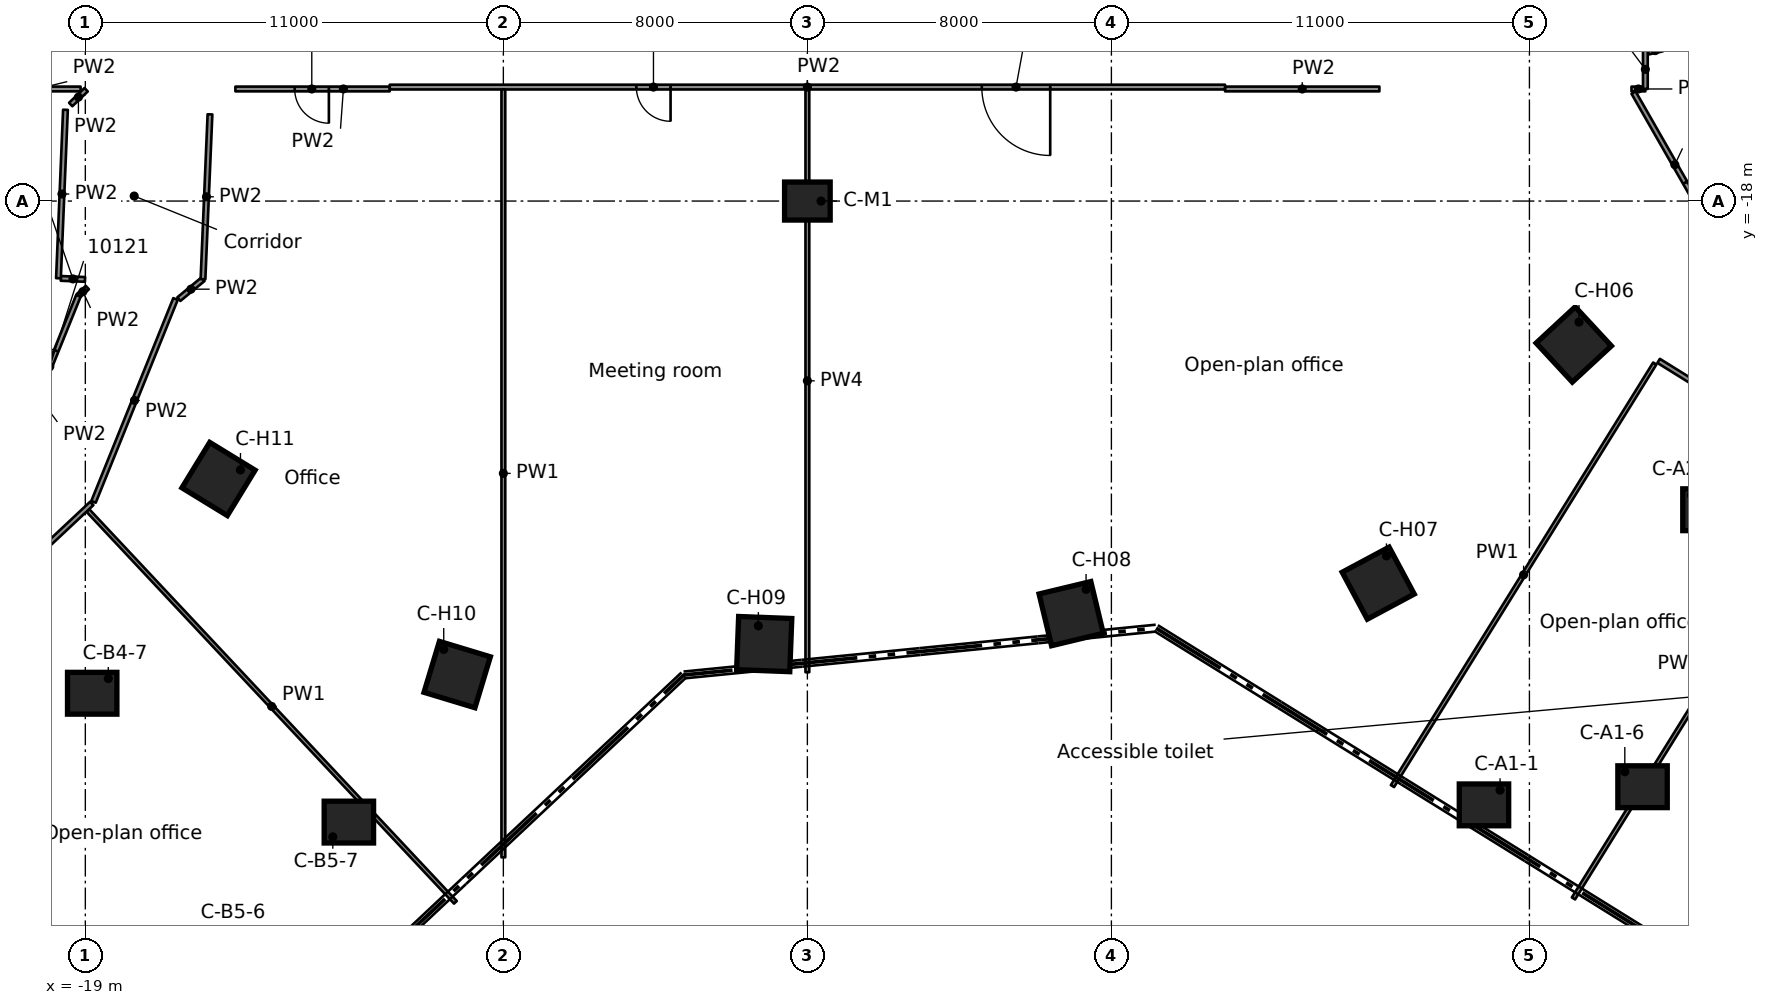
"""IFC4 building model, lengths in metres.
Left out: names, types, materials, properties, quantities, classifications, styles, units other than length and angle.
Written with IfcOpenShell. Run it as: python <this file> out.ifc"""

import sys

from ifc_helpers import new_model, si_unit, direction, frame, frame_2d, origin, origin_2d, place, context, subcontext, project, spatial, rectangle, extrude, element, fill, save


model = new_model("IFC4")
c1 = context("Model", 3, precision=1e-05, world=origin(), true_north=direction((0.0, 1.0)))
c2 = subcontext(c1, "Body", "Model", "MODEL_VIEW")
j1 = project(units=[si_unit("LENGTHUNIT", "METRE"), si_unit("PLANEANGLEUNIT", "RADIAN")], contexts=[c1])
p1 = place(None, origin())
s1 = spatial("IfcSite", under=j1, at=p1, CompositionType="ELEMENT")
p2 = place(p1, origin())
s2 = spatial("IfcBuilding", under=s1, at=p2, CompositionType="ELEMENT")
p3 = place(p2, frame((0.0, 0.0, 51.3)))
s3 = spatial("IfcBuildingStorey", under=s2, at=p3, CompositionType="ELEMENT", Elevation=51.3)
for number, where, z_axis, x_axis in (
    (1, (17.804, -33.888, 0.0), (0.0, 0.0, 1.0), (1.0, 0.0, 0.0)),
    (2, (21.977, -33.41, 0.0), (0.0, 0.0, 1.0), (1.0, 0.0, 0.0)),
    (3, (23.685, -26.122, 0.0), (0.0, 0.0, 1.0), (1.0, 0.0, 0.0)),
    (4, (-18.819, -30.951, 0.0), (0.0, 0.0, 1.0), (1.0, 0.0, 0.0)),
    (5, (-12.065, -34.341, 0.0), (0.0, 0.0, 1.0), (1.0, 0.0, 0.0)),
):
    element("IfcColumn", number, at=place(p3, frame(where, z_axis=z_axis, x_axis=x_axis)), inside=s3, PredefinedType="COLUMN", context=c2, shape_type="SweptSolid", body=[
        extrude(rectangle(XDim=1.3, YDim=1.1, at=origin_2d()), origin(), (0.0, 0.0, 1.0), 3.5),
    ])
for number, where, z_axis, x_axis in (
    (6, (20.167, -21.774, 0.0), (0.0, 0.0, 1.0), (0.68, -0.734, 0.0)),
    (7, (15.021, -28.054, 0.0), (0.0, 0.0, 1.0), (0.472, -0.882, 0.0)),
    (8, (6.942, -28.856, 0.0), (0.0, 0.0, 1.0), (0.234, -0.972, 0.0)),
    (9, (-1.136, -29.657, 0.0), (0.0, 0.0, 1.0), (-0.038, -0.999, 0.0)),
    (10, (-9.215, -30.459, 0.0), (0.0, 0.0, 1.0), (-0.29, -0.957, 0.0)),
    (11, (-15.495, -25.313, 0.0), (0.0, 0.0, 1.0), (-0.522, -0.853, 0.0)),
):
    element("IfcColumn", number, at=place(p3, frame(where, z_axis=z_axis, x_axis=x_axis)), inside=s3, PredefinedType="COLUMN", context=c2, shape_type="SweptSolid", body=[
        extrude(rectangle(XDim=1.4, YDim=1.4, at=origin_2d()), origin(), (0.0, 0.0, 1.0), 3.5),
    ])
p4 = place(p3, frame((0.0, -18.0, 0.0), z_axis=(0.0, 0.0, 1.0), x_axis=(1.0, 0.0, 0.0)))
e12 = element("IfcColumn", 12, at=p4, inside=s3, PredefinedType="COLUMN", context=c2, shape_type="SweptSolid", body=[
    extrude(rectangle(XDim=1.2, YDim=1.0, at=origin_2d()), origin(), (0.0, 0.0, 1.0), 3.5),
])
p5 = place(p3, frame((21.74, -15.145, 0.0), z_axis=(0.0, 0.0, 1.0), x_axis=(0.496826277176, -0.867850016021, 0.0)))
e13 = element("IfcWall", 13, at=p5, inside=s3, PredefinedType="PARTITIONING", context=c2, shape_type="SweptSolid", body=[
    extrude(rectangle(XDim=5.469, YDim=0.125, at=frame_2d((2.734, 0.0))), origin(), (0.0, 0.0, 1.0), 3.08),
])
p6 = place(p5, frame((2.733, 0.0, 0.0)))
e14 = element("IfcOpeningElement", 14, at=p6, cuts=e13, PredefinedType="OPENING", context=c2, shape_type="SweptSolid", body=[
    extrude(rectangle(XDim=0.9, YDim=2.1, at=frame_2d((0.45, 1.05))), frame((0.0, 0.073, 0.0), z_axis=(0.0, -1.0, 0.0), x_axis=(1.0, 0.0, 0.0)), (0.0, 0.0, 1.0), 0.145),
])
p7 = place(p3, frame((-26.451, -33.192, 0.0), z_axis=(0.0, 0.0, 1.0), x_axis=(0.684103113435, -0.729385309825, 0.0)))
e15 = element("IfcWall", 15, at=p7, inside=s3, PredefinedType="PARTITIONING", context=c2, shape_type="SweptSolid", body=[
    extrude(rectangle(XDim=14.137, YDim=0.1, at=frame_2d((7.068, 0.0))), origin(), (0.0, 0.0, 1.0), 2.445),
])
p8 = place(p3, frame((-18.934, -26.141, 0.0), z_axis=(0.0, 0.0, 1.0), x_axis=(0.684157665042, -0.729334141094, 0.0)))
e16 = element("IfcWall", 16, at=p8, inside=s3, PredefinedType="PARTITIONING", context=c2, shape_type="SweptSolid", body=[
    extrude(rectangle(XDim=14.137, YDim=0.1, at=frame_2d((7.069, 0.0))), origin(), (0.0, 0.0, 1.0), 3.08),
])
p9 = place(p3, frame((43.368, -35.223, 0.0), z_axis=(0.0, 0.0, 1.0), x_axis=(-0.849582235026, 0.527456183895, 0.0)))
e17 = element("IfcWall", 17, at=p9, inside=s3, PredefinedType="PARTITIONING", context=c2, shape_type="SweptSolid", body=[
    extrude(rectangle(XDim=24.68, YDim=0.125, at=frame_2d((12.34, 0.0))), origin(), (0.0, 0.0, 1.0), 3.08),
])
p10 = place(p9, frame((3.474, 0.0, 0.0)))
e18 = element("IfcOpeningElement", 18, at=p10, cuts=e17, PredefinedType="OPENING", context=c2, shape_type="SweptSolid", body=[
    extrude(rectangle(XDim=0.9, YDim=2.1, at=frame_2d((0.45, 1.05))), frame((0.0, 0.073, 0.0), z_axis=(0.0, -1.0, 0.0), x_axis=(1.0, 0.0, 0.0)), (0.0, 0.0, 1.0), 0.145),
])
p11 = place(p9, frame((21.473, 0.0, 0.0)))
e19 = element("IfcOpeningElement", 19, at=p11, cuts=e17, PredefinedType="OPENING", context=c2, shape_type="SweptSolid", body=[
    extrude(rectangle(XDim=1.1, YDim=2.1, at=frame_2d((0.55, 1.05))), frame((0.0, 0.073, 0.0), z_axis=(0.0, -1.0, 0.0), x_axis=(1.0, 0.0, 0.0)), (0.0, 0.0, 1.0), 0.145),
])
p12 = place(p9, frame((6.223, 0.0, 0.0)))
e20 = element("IfcOpeningElement", 20, at=p12, cuts=e17, PredefinedType="OPENING", context=c2, shape_type="SweptSolid", body=[
    extrude(rectangle(XDim=1.8, YDim=2.1, at=frame_2d((0.9, 1.05))), frame((0.0, 0.073, 0.0), z_axis=(0.0, -1.0, 0.0), x_axis=(1.0, 0.0, 0.0)), (0.0, 0.0, 1.0), 0.145),
])
p13 = place(p9, frame((11.474, 0.0, 0.0)))
e21 = element("IfcOpeningElement", 21, at=p13, cuts=e17, PredefinedType="OPENING", context=c2, shape_type="SweptSolid", body=[
    extrude(rectangle(XDim=1.1, YDim=2.1, at=frame_2d((0.55, 1.05))), frame((0.0, 0.073, 0.0), z_axis=(0.0, -1.0, 0.0), x_axis=(1.0, 0.0, 0.0)), (0.0, 0.0, 1.0), 0.145),
])
p14 = place(p3, frame((-16.539, -20.581, 0.0), z_axis=(0.0, 0.0, 1.0), x_axis=(0.771202229891, 0.636590229748, 0.0)))
e22 = element("IfcWall", 22, at=p14, inside=s3, PredefinedType="PARTITIONING", context=c2, shape_type="SweptSolid", body=[
    extrude(rectangle(XDim=0.823, YDim=0.125, at=frame_2d((0.412, 0.0))), origin(), (0.0, 0.0, 1.0), 3.08),
])
p15 = place(p3, frame((-19.644, -20.035, 0.0), z_axis=(0.0, 0.0, 1.0), x_axis=(0.999093412753, -0.04257173467, 0.0)))
e23 = element("IfcWall", 23, at=p15, inside=s3, PredefinedType="PARTITIONING", context=c2, shape_type="SweptSolid", body=[
    extrude(rectangle(XDim=0.636, YDim=0.125, at=frame_2d((0.318, 0.0))), origin(), (0.0, 0.0, 1.0), 3.08),
])
p16 = place(p3, frame((-21.418, -15.051, 0.0), z_axis=(0.0, 0.0, 1.0), x_axis=(1.0, 0.0, 0.0)))
e24 = element("IfcWall", 24, at=p16, inside=s3, PredefinedType="PARTITIONING", context=c2, shape_type="SweptSolid", body=[
    extrude(rectangle(XDim=2.293, YDim=0.125, at=frame_2d((1.146, 0.0))), origin(), (0.0, 0.0, 1.0), 3.08),
])
p17 = place(p3, frame((-10.991, -15.051, 0.0), z_axis=(0.0, 0.0, 1.0), x_axis=(-1.0, 0.0, 0.0)))
e25 = element("IfcWall", 25, at=p17, inside=s3, PredefinedType="PARTITIONING", context=c2, shape_type="SweptSolid", body=[
    extrude(rectangle(XDim=4.06, YDim=0.125, at=frame_2d((2.03, 0.0))), origin(), (0.0, 0.0, 1.0), 3.08),
])
p18 = place(p17, frame((1.6, 0.0, 0.0)))
e26 = element("IfcOpeningElement", 26, at=p18, cuts=e25, PredefinedType="OPENING", context=c2, shape_type="SweptSolid", body=[
    extrude(rectangle(XDim=0.9, YDim=2.1, at=frame_2d((0.45, 1.05))), frame((0.0, 0.073, 0.0), z_axis=(0.0, -1.0, 0.0), x_axis=(1.0, 0.0, 0.0)), (0.0, 0.0, 1.0), 0.145),
])
p19 = place(p3, frame((10.991, -15.051, 0.0), z_axis=(0.0, 0.0, 1.0), x_axis=(1.0, 0.0, 0.0)))
e27 = element("IfcWall", 27, at=p19, inside=s3, PredefinedType="PARTITIONING", context=c2, shape_type="SweptSolid", body=[
    extrude(rectangle(XDim=4.061, YDim=0.125, at=frame_2d((2.031, 0.0))), origin(), (0.0, 0.0, 1.0), 3.08),
])
p20 = place(p3, frame((21.686, -15.051, 0.0), z_axis=(0.0, 0.0, 1.0), x_axis=(1.0, 0.0, 0.0)))
e28 = element("IfcWall", 28, at=p20, inside=s3, PredefinedType="PARTITIONING", context=c2, shape_type="SweptSolid", body=[
    extrude(rectangle(XDim=0.364, YDim=0.125, at=frame_2d((0.182, 0.0))), origin(), (0.0, 0.0, 1.0), 3.08),
])
p21 = place(p3, frame((10.99, -15.001, 0.0), z_axis=(0.0, 0.0, 1.0), x_axis=(-1.0, 0.0, 0.0)))
e29 = element("IfcWall", 29, at=p21, inside=s3, PredefinedType="PARTITIONING", context=c2, shape_type="SweptSolid", body=[
    extrude(rectangle(XDim=21.98, YDim=0.125, at=frame_2d((10.99, 0.0))), origin(), (0.0, 0.0, 1.0), 3.08),
])
p22 = place(p21, frame((14.59, 0.0, 0.0)))
e30 = element("IfcOpeningElement", 30, at=p22, cuts=e29, PredefinedType="OPENING", context=c2, shape_type="SweptSolid", body=[
    extrude(rectangle(XDim=0.9, YDim=2.1, at=frame_2d((0.45, 1.05))), frame((0.0, 0.073, 0.0), z_axis=(0.0, -1.0, 0.0), x_axis=(1.0, 0.0, 0.0)), (0.0, 0.0, 1.0), 0.145),
])
p23 = place(p21, frame((4.6, 0.0, 0.0)))
e31 = element("IfcOpeningElement", 31, at=p23, cuts=e29, PredefinedType="OPENING", context=c2, shape_type="SweptSolid", body=[
    extrude(rectangle(XDim=1.8, YDim=2.1, at=frame_2d((0.9, 1.05))), frame((0.0, 0.073, 0.0), z_axis=(0.0, -1.0, 0.0), x_axis=(1.0, 0.0, 0.0)), (0.0, 0.0, 1.0), 0.145),
])
p24 = place(p3, frame((22.127, -14.081, 0.0), z_axis=(0.0, 0.0, 1.0), x_axis=(0.976967058765, 0.213390173362, 0.0)))
e32 = element("IfcWall", 32, at=p24, inside=s3, PredefinedType="PARTITIONING", context=c2, shape_type="SweptSolid", body=[
    extrude(rectangle(XDim=0.38, YDim=0.125, at=frame_2d((0.19, 0.0))), origin(), (0.0, 0.0, 1.0), 3.08),
])
p25 = place(p3, frame((-19.181, -20.491, 0.0), z_axis=(0.0, 0.0, 1.0), x_axis=(0.734655808159, 0.678440007325, 0.0)))
e33 = element("IfcWall", 33, at=p25, inside=s3, PredefinedType="PARTITIONING", context=c2, shape_type="SweptSolid", body=[
    extrude(rectangle(XDim=0.317, YDim=0.125, at=frame_2d((0.159, 0.0))), origin(), (0.0, 0.0, 1.0), 3.08),
])
p26 = place(p3, frame((-18.83, -25.956, 0.0), z_axis=(0.0, 0.0, 1.0), x_axis=(-0.729340205708, -0.684151199909, 0.0)))
e34 = element("IfcWall", 34, at=p26, inside=s3, PredefinedType="PARTITIONING", context=c2, shape_type="SweptSolid", body=[
    extrude(rectangle(XDim=25.009, YDim=0.125, at=frame_2d((12.504, 0.0))), origin(), (0.0, 0.0, 1.0), 3.08),
])
p27 = place(p26, frame((4.553, 0.0, 0.0)))
e35 = element("IfcOpeningElement", 35, at=p27, cuts=e34, PredefinedType="OPENING", context=c2, shape_type="SweptSolid", body=[
    extrude(rectangle(XDim=1.8, YDim=2.1, at=frame_2d((0.9, 1.05))), frame((0.0, 0.073, 0.0), z_axis=(0.0, -1.0, 0.0), x_axis=(1.0, 0.0, 0.0)), (0.0, 0.0, 1.0), 0.145),
])
p28 = place(p26, frame((14.609, 0.0, 0.0)))
e36 = element("IfcOpeningElement", 36, at=p28, cuts=e34, PredefinedType="OPENING", context=c2, shape_type="SweptSolid", body=[
    extrude(rectangle(XDim=0.9, YDim=2.1, at=frame_2d((0.45, 1.05))), frame((0.0, 0.073, 0.0), z_axis=(0.0, -1.0, 0.0), x_axis=(1.0, 0.0, 0.0)), (0.0, 0.0, 1.0), 0.145),
])
p29 = place(p26, frame((21.26, 0.0, 0.0)))
e37 = element("IfcOpeningElement", 37, at=p29, cuts=e34, PredefinedType="OPENING", context=c2, shape_type="SweptSolid", body=[
    extrude(rectangle(XDim=1.8, YDim=2.1, at=frame_2d((0.9, 1.05))), frame((0.0, 0.073, 0.0), z_axis=(0.0, -1.0, 0.0), x_axis=(1.0, 0.0, 0.0)), (0.0, 0.0, 1.0), 0.145),
])
p30 = place(p3, frame((-19.385, -15.46, 0.0), z_axis=(0.0, 0.0, 1.0), x_axis=(0.72214184162, 0.691745011245, 0.0)))
e38 = element("IfcWall", 38, at=p30, inside=s3, PredefinedType="PARTITIONING", context=c2, shape_type="SweptSolid", body=[
    extrude(rectangle(XDim=0.562, YDim=0.125, at=frame_2d((0.281, 0.0))), origin(), (0.0, 0.0, 1.0), 3.08),
])
p31 = place(p3, frame((20.159, -36.35, 0.0), z_axis=(0.0, 0.0, 1.0), x_axis=(0.527437340002, 0.849593933813, 0.0)))
e39 = element("IfcWall", 39, at=p31, inside=s3, PredefinedType="PARTITIONING", context=c2, shape_type="SweptSolid", body=[
    extrude(rectangle(XDim=13.137, YDim=0.1, at=frame_2d((6.568, 0.0))), origin(), (0.0, 0.0, 1.0), 3.08),
])
p32 = place(p3, frame((15.396, -33.393, 0.0), z_axis=(0.0, 0.0, 1.0), x_axis=(0.527427412062, 0.849600097107, 0.0)))
e40 = element("IfcWall", 40, at=p32, inside=s3, PredefinedType="PARTITIONING", context=c2, shape_type="SweptSolid", body=[
    extrude(rectangle(XDim=13.086, YDim=0.1, at=frame_2d((6.543, 0.0))), origin(), (0.0, 0.0, 1.0), 3.08),
])
p33 = place(p3, frame((-18.784, -25.914, 0.0), z_axis=(0.0, 0.0, 1.0), x_axis=(0.374700754386, 0.927145805504, 0.0)))
e41 = element("IfcWall", 41, at=p33, inside=s3, PredefinedType="PARTITIONING", context=c2, shape_type="SweptSolid", body=[
    extrude(rectangle(XDim=5.757, YDim=0.125, at=frame_2d((2.878, 0.0))), origin(), (0.0, 0.0, 1.0), 3.08),
])
p34 = place(p3, frame((-20.703, -24.255, 0.0), z_axis=(0.0, 0.0, 1.0), x_axis=(0.374955263634, 0.927042906382, 0.0)))
e42 = element("IfcWall", 42, at=p34, inside=s3, PredefinedType="PARTITIONING", context=c2, shape_type="SweptSolid", body=[
    extrude(rectangle(XDim=4.059, YDim=0.125, at=frame_2d((2.03, 0.0))), origin(), (0.0, 0.0, 1.0), 3.08),
])
p35 = place(p34, frame((1.6, 0.0, 0.0)))
e43 = element("IfcOpeningElement", 43, at=p35, cuts=e42, PredefinedType="OPENING", context=c2, shape_type="SweptSolid", body=[
    extrude(rectangle(XDim=0.9, YDim=2.1, at=frame_2d((0.45, 1.05))), frame((0.0, 0.073, 0.0), z_axis=(0.0, -1.0, 0.0), x_axis=(1.0, 0.0, 0.0)), (0.0, 0.0, 1.0), 0.145),
])
p36 = place(p3, frame((-15.904, -20.057, 0.0), z_axis=(0.0, 0.0, 1.0), x_axis=(0.042397681999, 0.999100814013, 0.0)))
e44 = element("IfcWall", 44, at=p36, inside=s3, PredefinedType="PARTITIONING", context=c2, shape_type="SweptSolid", body=[
    extrude(rectangle(XDim=4.342, YDim=0.125, at=frame_2d((2.171, 0.0))), origin(), (0.0, 0.0, 1.0), 3.08),
])
p37 = place(p3, frame((-19.707, -20.031, 0.0), z_axis=(0.0, 0.0, 1.0), x_axis=(0.04150005125, 0.999138501784, 0.0)))
e45 = element("IfcWall", 45, at=p37, inside=s3, PredefinedType="PARTITIONING", context=c2, shape_type="SweptSolid", body=[
    extrude(rectangle(XDim=4.436, YDim=0.125, at=frame_2d((2.218, 0.0))), origin(), (0.0, 0.0, 1.0), 3.08),
])
p38 = place(p3, frame((22.051, -15.049, 0.0), z_axis=(0.0, 0.0, 1.0), x_axis=(0.0, 1.0, 0.0)))
e46 = element("IfcWall", 46, at=p38, inside=s3, PredefinedType="PARTITIONING", context=c2, shape_type="SweptSolid", body=[
    extrude(rectangle(XDim=1.03, YDim=0.125, at=frame_2d((0.515, 0.0))), origin(), (0.0, 0.0, 1.0), 3.08),
])
p39 = place(p3, frame((0.0, -30.398, 0.0), z_axis=(0.0, 0.0, 1.0), x_axis=(0.0, 1.0, 0.0)))
e47 = element("IfcWall", 47, at=p39, inside=s3, PredefinedType="PARTITIONING", context=c2, shape_type="SweptSolid", body=[
    extrude(rectangle(XDim=15.335, YDim=0.1, at=frame_2d((7.667, 0.0))), origin(), (0.0, 0.0, 1.0), 2.445),
])
p40 = place(p3, frame((-8.0, -35.268, 0.0), z_axis=(0.0, 0.0, 1.0), x_axis=(0.0, 1.0, 0.0)))
e48 = element("IfcWall", 48, at=p40, inside=s3, PredefinedType="PARTITIONING", context=c2, shape_type="SweptSolid", body=[
    extrude(rectangle(XDim=20.205, YDim=0.1, at=frame_2d((10.103, 0.0))), origin(), (0.0, 0.0, 1.0), 3.08),
])
p41 = place(p6, origin())
e49 = element("IfcDoor", 49, at=p41, inside=s3, OperationType="SINGLE_SWING_RIGHT", PredefinedType="DOOR", context=c2, shape_type="SweptSolid", body=[
    extrude(rectangle(XDim=0.9, YDim=2.1, at=frame_2d((0.45, 1.05))), frame((0.0, 0.025, 0.0), z_axis=(0.0, -1.0, 0.0), x_axis=(1.0, 0.0, 0.0)), (0.0, 0.0, 1.0), 0.05),
])
fill(e14, e49)
p42 = place(p35, origin())
e50 = element("IfcDoor", 50, at=p42, inside=s3, OperationType="SINGLE_SWING_RIGHT", PredefinedType="DOOR", context=c2, shape_type="SweptSolid", body=[
    extrude(rectangle(XDim=0.9, YDim=2.1, at=frame_2d((0.45, 1.05))), frame((0.0, 0.025, 0.0), z_axis=(0.0, -1.0, 0.0), x_axis=(1.0, 0.0, 0.0)), (0.0, 0.0, 1.0), 0.05),
])
fill(e43, e50)
p43 = place(p18, origin())
e51 = element("IfcDoor", 51, at=p43, inside=s3, OperationType="SINGLE_SWING_RIGHT", PredefinedType="DOOR", context=c2, shape_type="SweptSolid", body=[
    extrude(rectangle(XDim=0.9, YDim=2.1, at=frame_2d((0.45, 1.05))), frame((0.0, 0.025, 0.0), z_axis=(0.0, -1.0, 0.0), x_axis=(1.0, 0.0, 0.0)), (0.0, 0.0, 1.0), 0.05),
])
fill(e26, e51)
p44 = place(p22, origin())
e52 = element("IfcDoor", 52, at=p44, inside=s3, OperationType="SINGLE_SWING_RIGHT", PredefinedType="DOOR", context=c2, shape_type="SweptSolid", body=[
    extrude(rectangle(XDim=0.9, YDim=2.1, at=frame_2d((0.45, 1.05))), frame((0.0, 0.025, 0.0), z_axis=(0.0, -1.0, 0.0), x_axis=(1.0, 0.0, 0.0)), (0.0, 0.0, 1.0), 0.05),
])
fill(e30, e52)
p45 = place(p23, origin())
e53 = element("IfcDoor", 53, at=p45, inside=s3, OperationType="DOUBLE_DOOR_SINGLE_SWING", PredefinedType="DOOR", context=c2, shape_type="SweptSolid", body=[
    extrude(rectangle(XDim=1.8, YDim=2.1, at=frame_2d((0.9, 1.05))), frame((0.0, 0.025, 0.0), z_axis=(0.0, -1.0, 0.0), x_axis=(1.0, 0.0, 0.0)), (0.0, 0.0, 1.0), 0.05),
])
fill(e31, e53)
save(model, sys.argv[1])
